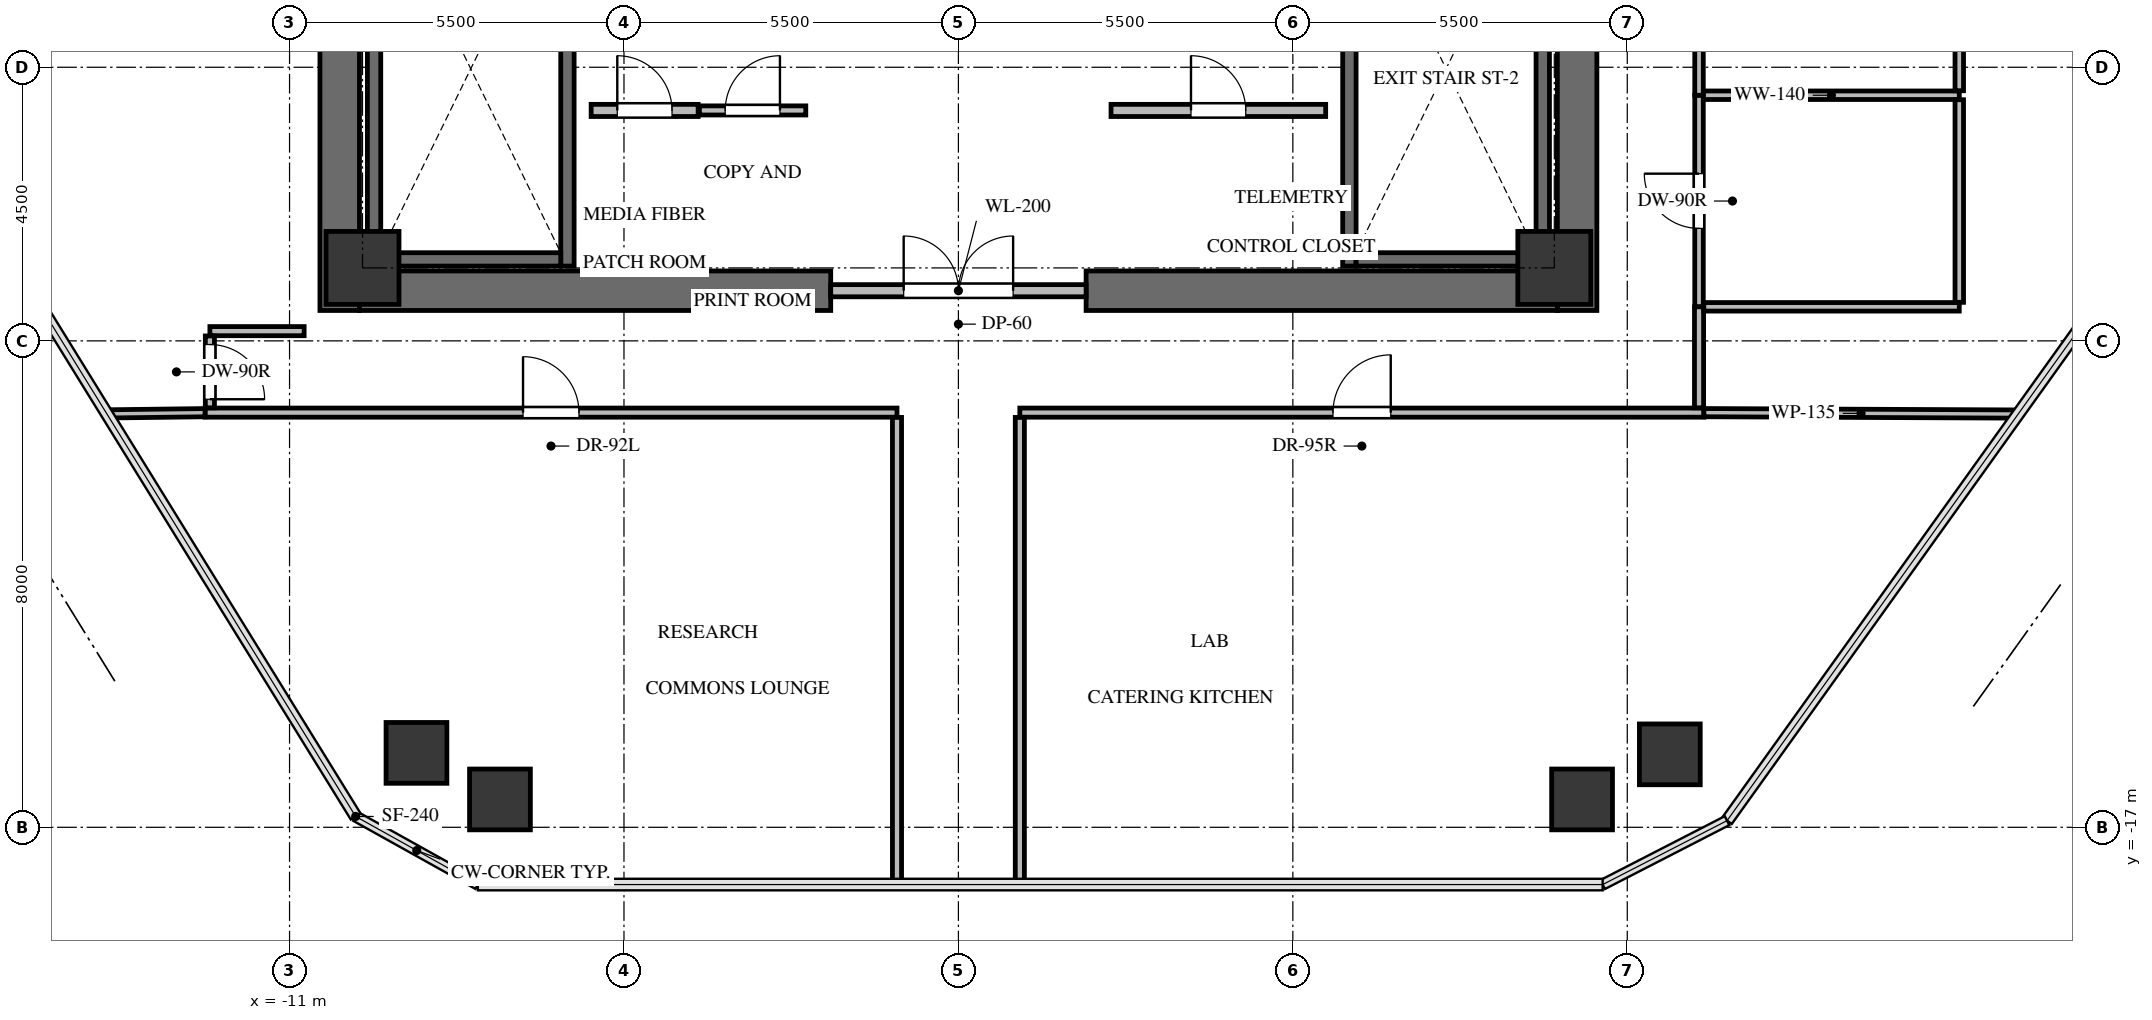
"""IFC4 building model, lengths in metres.
Left out: names, types, materials, properties, quantities, classifications, styles, units other than length and angle.
Written with IfcOpenShell. Run it as: python <this file> out.ifc"""

import sys

from ifc_helpers import new_model, si_unit, direction, frame, frame_2d, origin, origin_2d, place, context, subcontext, project, spatial, rectangle, extrude, source, transform, mapped, element, fill, save


model = new_model("IFC4")
c1 = context("Model", 3, precision=1e-05, world=origin(), true_north=direction((0.0, 1.0)))
c2 = subcontext(c1, "Body", "Model", "MODEL_VIEW")
j1 = project(units=[si_unit("LENGTHUNIT", "METRE"), si_unit("PLANEANGLEUNIT", "RADIAN")], contexts=[c1])
p1 = place(None, origin())
s1 = spatial("IfcSite", under=j1, at=p1, CompositionType="ELEMENT")
p2 = place(p1, origin())
s2 = spatial("IfcBuilding", under=s1, at=p2, CompositionType="ELEMENT")
p3 = place(p2, frame((0.0, 0.0, 167.2)))
s3 = spatial("IfcBuildingStorey", under=s2, at=p3, CompositionType="ELEMENT", Elevation=167.2)
for number, where, z_axis, x_axis in (
    (1, (-10.175, -8.5, 0.0), (0.0, 0.0, 1.0), (0.0, 1.0, 0.0)),
    (2, (10.175, -8.5, 0.0), (0.0, 0.0, 1.0), (0.0, 1.0, 0.0)),
):
    element("IfcWall", number, at=place(p3, frame(where, z_axis=z_axis, x_axis=x_axis)), inside=s3, PredefinedType="SHEAR", context=c2, shape_type="SweptSolid", body=[
        extrude(rectangle(XDim=17.0, YDim=0.65, at=frame_2d((8.5, 0.0))), origin(), (0.0, 0.0, 1.0), 3.3),
    ])
for number, where, z_axis, x_axis in (
    (3, (-9.85, -8.175, 0.0), (0.0, 0.0, 1.0), (1.0, 0.0, 0.0)),
    (4, (2.1, -8.175, 0.0), (0.0, 0.0, 1.0), (1.0, 0.0, 0.0)),
):
    element("IfcWall", number, at=place(p3, frame(where, z_axis=z_axis, x_axis=x_axis)), inside=s3, PredefinedType="SHEAR", context=c2, shape_type="SweptSolid", body=[
        extrude(rectangle(XDim=7.75, YDim=0.65, at=frame_2d((3.875, 0.0))), origin(), (0.0, 0.0, 1.0), 3.3),
    ])
p4 = place(p3, frame((-6.43, -7.77, -0.24), z_axis=(0.0, 0.0, 1.0), x_axis=(0.0, 1.0, 0.0)))
e5 = element("IfcWall", 5, at=p4, inside=s3, PredefinedType="SHEAR", context=c2, shape_type="SweptSolid", body=[
    extrude(rectangle(XDim=7.89, YDim=0.22, at=frame_2d((3.945, 0.0))), origin(), (0.0, 0.0, 1.0), 3.3),
])
p5 = place(p4, frame((6.32, 0.0, 0.0)))
e6 = element("IfcOpeningElement", 6, at=p5, cuts=e5, PredefinedType="OPENING", context=c2, shape_type="SweptSolid", body=[
    extrude(rectangle(XDim=1.05, YDim=2.15, at=frame_2d((0.525, 1.075))), frame((0.0, 0.12, 0.0), z_axis=(0.0, -1.0, 0.0), x_axis=(1.0, 0.0, 0.0)), (0.0, 0.0, 1.0), 0.24),
])
p6 = place(p3, frame((-9.61, 0.12, -0.24), z_axis=(0.0, 0.0, 1.0), x_axis=(0.0, -1.0, 0.0)))
e7 = element("IfcWall", 7, at=p6, inside=s3, PredefinedType="SHEAR", context=c2, shape_type="SweptSolid", body=[
    extrude(rectangle(XDim=7.89, YDim=0.22, at=frame_2d((3.945, 0.0))), origin(), (0.0, 0.0, 1.0), 3.3),
])
p7 = place(p3, frame((-9.5, -7.66, -0.24), z_axis=(0.0, 0.0, 1.0), x_axis=(1.0, 0.0, 0.0)))
e8 = element("IfcWall", 8, at=p7, inside=s3, PredefinedType="SHEAR", context=c2, shape_type="SweptSolid", body=[
    extrude(rectangle(XDim=2.96, YDim=0.22, at=frame_2d((1.48, 0.0))), origin(), (0.0, 0.0, 1.0), 3.3),
])
p8 = place(p3, frame((9.61, -7.77, -0.24), z_axis=(0.0, 0.0, 1.0), x_axis=(0.0, 1.0, 0.0)))
e9 = element("IfcWall", 9, at=p8, inside=s3, PredefinedType="SHEAR", context=c2, shape_type="SweptSolid", body=[
    extrude(rectangle(XDim=7.89, YDim=0.22, at=frame_2d((3.945, 0.0))), origin(), (0.0, 0.0, 1.0), 3.3),
])
p9 = place(p3, frame((6.43, 0.12, -0.24), z_axis=(0.0, 0.0, 1.0), x_axis=(0.0, -1.0, 0.0)))
e10 = element("IfcWall", 10, at=p9, inside=s3, PredefinedType="SHEAR", context=c2, shape_type="SweptSolid", body=[
    extrude(rectangle(XDim=7.89, YDim=0.22, at=frame_2d((3.945, 0.0))), origin(), (0.0, 0.0, 1.0), 3.3),
])
p10 = place(p9, frame((0.52, 0.0, 0.0)))
e11 = element("IfcOpeningElement", 11, at=p10, cuts=e10, PredefinedType="OPENING", context=c2, shape_type="SweptSolid", body=[
    extrude(rectangle(XDim=1.05, YDim=2.15, at=frame_2d((0.525, 1.075))), frame((0.0, 0.12, 0.0), z_axis=(0.0, -1.0, 0.0), x_axis=(1.0, 0.0, 0.0)), (0.0, 0.0, 1.0), 0.24),
])
p11 = place(p3, frame((6.54, -7.66, -0.24), z_axis=(0.0, 0.0, 1.0), x_axis=(1.0, 0.0, 0.0)))
e12 = element("IfcWall", 12, at=p11, inside=s3, PredefinedType="SHEAR", context=c2, shape_type="SweptSolid", body=[
    extrude(rectangle(XDim=2.96, YDim=0.22, at=frame_2d((1.48, 0.0))), origin(), (0.0, 0.0, 1.0), 3.3),
])
m1 = source(origin(), c2, "Body", "SweptSolid", [
    extrude(rectangle(XDim=1.2, YDim=1.2, at=origin_2d()), origin(), (0.0, 0.0, 1.0), 3.3),
])
for number, where, z_axis, x_axis in (
    (13, (-9.8, -7.8, -0.24), (0.0, 0.0, 1.0), (1.0, 0.0, 0.0)),
    (14, (9.8, -7.8, -0.24), (0.0, 0.0, 1.0), (1.0, 0.0, 0.0)),
):
    element("IfcColumn", number, at=place(p3, frame(where, z_axis=z_axis, x_axis=x_axis)), inside=s3, PredefinedType="COLUMN", context=c2, shape_type="MappedRepresentation", body=[
        mapped(m1, transform((0.0, 0.0, 0.0), x_axis=(1.0, 0.0, 0.0), y_axis=(0.0, 1.0, 0.0), z_axis=(0.0, 0.0, 1.0), scale=1.0)),
    ])
m2 = source(origin(), c2, "Body", "SweptSolid", [
    extrude(rectangle(XDim=1.0, YDim=1.0, at=origin_2d()), origin(), (0.0, 0.0, 1.0), 3.3),
])
for number, where, z_axis, x_axis in (
    (15, (-8.913, -15.776, -0.24), (0.0, 0.0, 1.0), (1.0, 0.0, 0.0)),
    (16, (11.7, -15.8, -0.24), (0.0, 0.0, 1.0), (1.0, 0.0, 0.0)),
    (17, (10.257, -16.542, -0.24), (0.0, 0.0, 1.0), (1.0, 0.0, 0.0)),
    (18, (-7.54, -16.542, -0.24), (0.0, 0.0, 1.0), (1.0, 0.0, 0.0)),
):
    element("IfcColumn", number, at=place(p3, frame(where, z_axis=z_axis, x_axis=x_axis)), inside=s3, PredefinedType="COLUMN", context=c2, shape_type="MappedRepresentation", body=[
        mapped(m2, transform((0.0, 0.0, 0.0), x_axis=(1.0, 0.0, 0.0), y_axis=(0.0, 1.0, 0.0), z_axis=(0.0, 0.0, 1.0), scale=1.0)),
    ])
p12 = place(p3, frame((-2.1, -8.175, 0.0), z_axis=(0.0, 0.0, 1.0), x_axis=(1.0, 0.0, 0.0)))
e19 = element("IfcWall", 19, at=p12, inside=s3, PredefinedType="SOLIDWALL", context=c2, shape_type="SweptSolid", body=[
    extrude(rectangle(XDim=4.2, YDim=0.2, at=frame_2d((2.1, 0.0))), origin(), (0.0, 0.0, 1.0), 3.045),
])
p13 = place(p12, frame((1.2, 0.0, 0.0)))
e20 = element("IfcOpeningElement", 20, at=p13, cuts=e19, PredefinedType="OPENING", context=c2, shape_type="SweptSolid", body=[
    extrude(rectangle(XDim=1.8, YDim=2.15, at=frame_2d((0.9, 1.075))), frame((0.0, 0.11, 0.0), z_axis=(0.0, -1.0, 0.0), x_axis=(1.0, 0.0, 0.0)), (0.0, 0.0, 1.0), 0.22),
])
p14 = place(p3, frame((-6.04, -5.21, 0.0), z_axis=(0.0, 0.0, 1.0), x_axis=(1.0, 0.0, 0.0)))
e21 = element("IfcWall", 21, at=p14, inside=s3, PredefinedType="SOLIDWALL", context=c2, shape_type="SweptSolid", body=[
    extrude(rectangle(XDim=1.76, YDim=0.2, at=frame_2d((0.88, 0.0))), origin(), (0.0, 0.0, 1.0), 3.045),
])
p15 = place(p14, frame((0.43, 0.0, 0.0)))
e22 = element("IfcOpeningElement", 22, at=p15, cuts=e21, PredefinedType="OPENING", context=c2, shape_type="SweptSolid", body=[
    extrude(rectangle(XDim=0.9, YDim=2.05, at=frame_2d((0.45, 1.025))), frame((0.0, 0.11, 0.0), z_axis=(0.0, -1.0, 0.0), x_axis=(1.0, 0.0, 0.0)), (0.0, 0.0, 1.0), 0.22),
])
p16 = place(p3, frame((-4.26, -5.21, 0.0), z_axis=(0.0, 0.0, 1.0), x_axis=(1.0, 0.0, 0.0)))
e23 = element("IfcWall", 23, at=p16, inside=s3, PredefinedType="PARTITIONING", context=c2, shape_type="SweptSolid", body=[
    extrude(rectangle(XDim=1.75, YDim=0.15, at=frame_2d((0.875, 0.0))), origin(), (0.0, 0.0, 1.0), 3.045),
])
p17 = place(p16, frame((0.425, 0.0, 0.0)))
e24 = element("IfcOpeningElement", 24, at=p17, cuts=e23, PredefinedType="OPENING", context=c2, shape_type="SweptSolid", body=[
    extrude(rectangle(XDim=0.9, YDim=2.05, at=frame_2d((0.45, 1.025))), frame((0.0, 0.085, 0.0), z_axis=(0.0, -1.0, 0.0), x_axis=(1.0, 0.0, 0.0)), (0.0, 0.0, 1.0), 0.17),
])
p18 = place(p3, frame((2.51, -5.21, 0.0), z_axis=(0.0, 0.0, 1.0), x_axis=(1.0, 0.0, 0.0)))
e25 = element("IfcWall", 25, at=p18, inside=s3, PredefinedType="SOLIDWALL", context=c2, shape_type="SweptSolid", body=[
    extrude(rectangle(XDim=3.53, YDim=0.2, at=frame_2d((1.765, 0.0))), origin(), (0.0, 0.0, 1.0), 3.045),
])
p19 = place(p18, frame((1.315, 0.0, 0.0)))
e26 = element("IfcOpeningElement", 26, at=p19, cuts=e25, PredefinedType="OPENING", context=c2, shape_type="SweptSolid", body=[
    extrude(rectangle(XDim=0.9, YDim=2.05, at=frame_2d((0.45, 1.025))), frame((0.0, 0.11, 0.0), z_axis=(0.0, -1.0, 0.0), x_axis=(1.0, 0.0, 0.0)), (0.0, 0.0, 1.0), 0.22),
])
p20 = place(p3, frame((12.18, -8.44, 0.0), z_axis=(0.0, 0.0, 1.0), x_axis=(0.0, 1.0, 0.0)))
e27 = element("IfcWall", 27, at=p20, inside=s3, PredefinedType="PARTITIONING", context=c2, shape_type="SweptSolid", body=[
    extrude(rectangle(XDim=3.48, YDim=0.14, at=frame_2d((1.74, 0.0))), origin(), (0.0, 0.0, 1.0), 3.045),
])
p21 = place(p20, frame((1.29, 0.0, 0.0)))
e28 = element("IfcOpeningElement", 28, at=p21, cuts=e27, PredefinedType="OPENING", context=c2, shape_type="SweptSolid", body=[
    extrude(rectangle(XDim=0.9, YDim=2.05, at=frame_2d((0.45, 1.025))), frame((0.0, 0.08, 0.0), z_axis=(0.0, -1.0, 0.0), x_axis=(1.0, 0.0, 0.0)), (0.0, 0.0, 1.0), 0.16),
])
p22 = place(p3, frame((12.18, -4.96, 0.0), z_axis=(0.0, 0.0, 1.0), x_axis=(0.0, 1.0, 0.0)))
e29 = element("IfcWall", 29, at=p22, inside=s3, PredefinedType="PARTITIONING", context=c2, shape_type="SweptSolid", body=[
    extrude(rectangle(XDim=3.4, YDim=0.14, at=frame_2d((1.7, 0.0))), origin(), (0.0, 0.0, 1.0), 3.045),
])
p23 = place(p22, frame((1.25, 0.0, 0.0)))
e30 = element("IfcOpeningElement", 30, at=p23, cuts=e29, PredefinedType="OPENING", context=c2, shape_type="SweptSolid", body=[
    extrude(rectangle(XDim=0.9, YDim=2.05, at=frame_2d((0.45, 1.025))), frame((0.0, 0.08, 0.0), z_axis=(0.0, -1.0, 0.0), x_axis=(1.0, 0.0, 0.0)), (0.0, 0.0, 1.0), 0.16),
])
p24 = place(p3, frame((-12.39, -10.18, 0.0), z_axis=(0.0, 0.0, 1.0), x_axis=(1.0, 0.0, 0.0)))
e31 = element("IfcWall", 31, at=p24, inside=s3, PredefinedType="PARTITIONING", context=c2, shape_type="SweptSolid", body=[
    extrude(rectangle(XDim=11.38, YDim=0.15, at=frame_2d((5.69, 0.0))), origin(), (0.0, 0.0, 1.0), 2.242),
])
p25 = place(p24, frame((5.23, 0.0, 0.0)))
e32 = element("IfcOpeningElement", 32, at=p25, cuts=e31, PredefinedType="OPENING", context=c2, shape_type="SweptSolid", body=[
    extrude(rectangle(XDim=0.92, YDim=2.1, at=frame_2d((0.46, 1.05))), frame((0.0, 0.085, 0.0), z_axis=(0.0, -1.0, 0.0), x_axis=(1.0, 0.0, 0.0)), (0.0, 0.0, 1.0), 0.17),
])
p26 = place(p3, frame((-1.01, -10.259, 0.0), z_axis=(0.0, 0.0, 1.0), x_axis=(0.0, -1.0, 0.0)))
e33 = element("IfcWall", 33, at=p26, inside=s3, PredefinedType="PARTITIONING", context=c2, shape_type="SweptSolid", body=[
    extrude(rectangle(XDim=7.683, YDim=0.15, at=frame_2d((3.841, 0.0))), origin(), (0.0, 0.0, 1.0), 2.399),
])
p27 = place(p3, frame((1.01, -10.18, 0.0), z_axis=(0.0, 0.0, 1.0), x_axis=(1.0, 0.0, 0.0)))
e34 = element("IfcWall", 34, at=p27, inside=s3, PredefinedType="PARTITIONING", context=c2, shape_type="SweptSolid", body=[
    extrude(rectangle(XDim=11.25, YDim=0.15, at=frame_2d((5.625, 0.0))), origin(), (0.0, 0.0, 1.0), 2.242),
])
p28 = place(p27, frame((5.15, 0.0, 0.0)))
e35 = element("IfcOpeningElement", 35, at=p28, cuts=e34, PredefinedType="OPENING", context=c2, shape_type="SweptSolid", body=[
    extrude(rectangle(XDim=0.95, YDim=2.1, at=frame_2d((0.475, 1.05))), frame((0.0, 0.085, 0.0), z_axis=(0.0, -1.0, 0.0), x_axis=(1.0, 0.0, 0.0)), (0.0, 0.0, 1.0), 0.17),
])
p29 = place(p3, frame((1.01, -17.942, 0.0), z_axis=(0.0, 0.0, 1.0), x_axis=(0.0, 1.0, 0.0)))
e36 = element("IfcWall", 36, at=p29, inside=s3, PredefinedType="PARTITIONING", context=c2, shape_type="SweptSolid", body=[
    extrude(rectangle(XDim=7.683, YDim=0.15, at=frame_2d((3.841, 0.0))), origin(), (0.0, 0.0, 1.0), 2.399),
])
p30 = place(p3, frame((-10.76, -8.84, 0.0), z_axis=(0.0, 0.0, 1.0), x_axis=(-1.0, 0.0, 0.0)))
e37 = element("IfcWall", 37, at=p30, inside=s3, PredefinedType="PARTITIONING", context=c2, shape_type="SweptSolid", body=[
    extrude(rectangle(XDim=1.55, YDim=0.15, at=frame_2d((0.775, 0.0))), origin(), (0.0, 0.0, 1.0), 3.045),
])
p31 = place(p3, frame((-12.31, -8.919, 0.0), z_axis=(0.0, 0.0, 1.0), x_axis=(0.0, -1.0, 0.0)))
e38 = element("IfcWall", 38, at=p31, inside=s3, PredefinedType="PARTITIONING", context=c2, shape_type="SweptSolid", body=[
    extrude(rectangle(XDim=1.182, YDim=0.15, at=frame_2d((0.591, 0.0))), origin(), (0.0, 0.0, 1.0), 2.399),
])
p32 = place(p31, frame((0.141, 0.0, 0.0)))
e39 = element("IfcOpeningElement", 39, at=p32, cuts=e38, PredefinedType="OPENING", context=c2, shape_type="SweptSolid", body=[
    extrude(rectangle(XDim=0.9, YDim=2.05, at=frame_2d((0.45, 1.025))), frame((0.0, 0.085, 0.0), z_axis=(0.0, -1.0, 0.0), x_axis=(1.0, 0.0, 0.0)), (0.0, 0.0, 1.0), 0.17),
])
p33 = place(p3, frame((12.18, -10.101, 0.0), z_axis=(0.0, 0.0, 1.0), x_axis=(0.0, 1.0, 0.0)))
e40 = element("IfcWall", 40, at=p33, inside=s3, PredefinedType="PARTITIONING", context=c2, shape_type="SweptSolid", body=[
    extrude(rectangle(XDim=1.661, YDim=0.15, at=frame_2d((0.831, 0.0))), origin(), (0.0, 0.0, 1.0), 3.045),
])
p34 = place(p3, frame((12.254, -4.96, 0.0), z_axis=(0.0, 0.0, 1.0), x_axis=(1.0, 0.0, 0.0)))
e41 = element("IfcWall", 41, at=p34, inside=s3, PredefinedType="PARTITIONING", context=c2, shape_type="SweptSolid", body=[
    extrude(rectangle(XDim=4.206, YDim=0.14, at=frame_2d((2.103, 0.0))), origin(), (0.0, 0.0, 1.0), 3.045),
])
p35 = place(p3, frame((16.46, -8.44, 0.0), z_axis=(0.0, 0.0, 1.0), x_axis=(-1.0, 0.0, 0.0)))
e42 = element("IfcWall", 42, at=p35, inside=s3, PredefinedType="PARTITIONING", context=c2, shape_type="SweptSolid", body=[
    extrude(rectangle(XDim=4.201, YDim=0.14, at=frame_2d((2.101, 0.0))), origin(), (0.0, 0.0, 1.0), 3.045),
])
p36 = place(p3, frame((16.46, -5.034, 0.0), z_axis=(0.0, 0.0, 1.0), x_axis=(0.0, -1.0, 0.0)))
e43 = element("IfcWall", 43, at=p36, inside=s3, PredefinedType="PARTITIONING", context=c2, shape_type="SweptSolid", body=[
    extrude(rectangle(XDim=3.332, YDim=0.14, at=frame_2d((1.666, 0.0))), origin(), (0.0, 0.0, 1.0), 3.045),
])
p37 = place(p3, frame((16.46, -1.634, 0.0), z_axis=(0.0, 0.0, 1.0), x_axis=(0.0, -1.0, 0.0)))
e44 = element("IfcWall", 44, at=p37, inside=s3, PredefinedType="PARTITIONING", context=c2, shape_type="SweptSolid", body=[
    extrude(rectangle(XDim=3.252, YDim=0.14, at=frame_2d((1.626, 0.0))), origin(), (0.0, 0.0, 1.0), 3.045),
])
p38 = place(p3, frame((-14.004, -10.201, 0.0), z_axis=(0.0, 0.0, 1.0), x_axis=(0.999923084603, 0.012402615782, 0.0)))
e45 = element("IfcWall", 45, at=p38, inside=s3, PredefinedType="PARTITIONING", context=c2, shape_type="SweptSolid", body=[
    extrude(rectangle(XDim=1.614, YDim=0.135, at=frame_2d((0.807, 0.0))), origin(), (0.0, 0.0, 1.0), 2.399),
])
p39 = place(p3, frame((12.26, -10.18, 0.0), z_axis=(0.0, 0.0, 1.0), x_axis=(0.999990144117, -0.004439782427, 0.0)))
e46 = element("IfcWall", 46, at=p39, inside=s3, PredefinedType="PARTITIONING", context=c2, shape_type="SweptSolid", body=[
    extrude(rectangle(XDim=5.169, YDim=0.135, at=frame_2d((2.584, 0.0))), origin(), (0.0, 0.0, 1.0), 2.399),
])
m3 = source(origin(), c2, "Body", "SweptSolid", [
    extrude(rectangle(XDim=1.8, YDim=2.15, at=frame_2d((0.9, 1.075))), frame((0.0, 0.025, 0.0), z_axis=(0.0, -1.0, 0.0), x_axis=(1.0, 0.0, 0.0)), (0.0, 0.0, 1.0), 0.05),
])
p40 = place(p13, origin())
e47 = element("IfcDoor", 47, at=p40, inside=s3, OperationType="DOUBLE_DOOR_SINGLE_SWING", PredefinedType="DOOR", context=c2, shape_type="MappedRepresentation", body=[
    mapped(m3, transform((0.0, 0.0, 0.0), x_axis=(1.0, 0.0, 0.0), y_axis=(0.0, 1.0, 0.0), z_axis=(0.0, 0.0, 1.0), scale=1.0)),
])
fill(e20, e47)
m4 = source(origin(), c2, "Body", "SweptSolid", [
    extrude(rectangle(XDim=0.9, YDim=2.05, at=frame_2d((0.45, 1.025))), frame((0.0, 0.025, 0.0), z_axis=(0.0, -1.0, 0.0), x_axis=(1.0, 0.0, 0.0)), (0.0, 0.0, 1.0), 0.05),
])
p41 = place(p15, origin())
e48 = element("IfcDoor", 48, at=p41, inside=s3, OperationType="SINGLE_SWING_LEFT", PredefinedType="DOOR", context=c2, shape_type="MappedRepresentation", body=[
    mapped(m4, transform((0.0, 0.0, 0.0), x_axis=(1.0, 0.0, 0.0), y_axis=(0.0, 1.0, 0.0), z_axis=(0.0, 0.0, 1.0), scale=1.0)),
])
fill(e22, e48)
m5 = source(origin(), c2, "Body", "SweptSolid", [
    extrude(rectangle(XDim=0.9, YDim=2.05, at=frame_2d((0.45, 1.025))), frame((0.0, 0.025, 0.0), z_axis=(0.0, -1.0, 0.0), x_axis=(1.0, 0.0, 0.0)), (0.0, 0.0, 1.0), 0.05),
])
p42 = place(p17, origin())
e49 = element("IfcDoor", 49, at=p42, inside=s3, OperationType="SINGLE_SWING_RIGHT", PredefinedType="DOOR", context=c2, shape_type="MappedRepresentation", body=[
    mapped(m5, transform((0.0, 0.0, 0.0), x_axis=(1.0, 0.0, 0.0), y_axis=(0.0, 1.0, 0.0), z_axis=(0.0, 0.0, 1.0), scale=1.0)),
])
fill(e24, e49)
p43 = place(p19, origin())
e50 = element("IfcDoor", 50, at=p43, inside=s3, OperationType="SINGLE_SWING_LEFT", PredefinedType="DOOR", context=c2, shape_type="MappedRepresentation", body=[
    mapped(m4, transform((0.0, 0.0, 0.0), x_axis=(1.0, 0.0, 0.0), y_axis=(0.0, 1.0, 0.0), z_axis=(0.0, 0.0, 1.0), scale=1.0)),
])
fill(e26, e50)
m6 = source(origin(), c2, "Body", "SweptSolid", [
    extrude(rectangle(XDim=0.9, YDim=2.05, at=frame_2d((0.45, 1.025))), frame((0.0, 0.025, 0.0), z_axis=(0.0, -1.0, 0.0), x_axis=(1.0, 0.0, 0.0)), (0.0, 0.0, 1.0), 0.05),
])
p44 = place(p21, origin())
e51 = element("IfcDoor", 51, at=p44, inside=s3, OperationType="SINGLE_SWING_RIGHT", PredefinedType="DOOR", context=c2, shape_type="MappedRepresentation", body=[
    mapped(m6, transform((0.0, 0.0, 0.0), x_axis=(1.0, 0.0, 0.0), y_axis=(0.0, 1.0, 0.0), z_axis=(0.0, 0.0, 1.0), scale=1.0)),
])
fill(e28, e51)
m7 = source(origin(), c2, "Body", "SweptSolid", [
    extrude(rectangle(XDim=0.92, YDim=2.1, at=frame_2d((0.46, 1.05))), frame((0.0, 0.025, 0.0), z_axis=(0.0, -1.0, 0.0), x_axis=(1.0, 0.0, 0.0)), (0.0, 0.0, 1.0), 0.05),
])
p45 = place(p25, origin())
e52 = element("IfcDoor", 52, at=p45, inside=s3, OperationType="SINGLE_SWING_LEFT", PredefinedType="DOOR", context=c2, shape_type="MappedRepresentation", body=[
    mapped(m7, transform((0.0, 0.0, 0.0), x_axis=(1.0, 0.0, 0.0), y_axis=(0.0, 1.0, 0.0), z_axis=(0.0, 0.0, 1.0), scale=1.0)),
])
fill(e32, e52)
m8 = source(origin(), c2, "Body", "SweptSolid", [
    extrude(rectangle(XDim=0.95, YDim=2.1, at=frame_2d((0.475, 1.05))), frame((0.0, 0.025, 0.0), z_axis=(0.0, -1.0, 0.0), x_axis=(1.0, 0.0, 0.0)), (0.0, 0.0, 1.0), 0.05),
])
p46 = place(p28, origin())
e53 = element("IfcDoor", 53, at=p46, inside=s3, OperationType="SINGLE_SWING_RIGHT", PredefinedType="DOOR", context=c2, shape_type="MappedRepresentation", body=[
    mapped(m8, transform((0.0, 0.0, 0.0), x_axis=(1.0, 0.0, 0.0), y_axis=(0.0, 1.0, 0.0), z_axis=(0.0, 0.0, 1.0), scale=1.0)),
])
fill(e35, e53)
p47 = place(p32, origin())
e54 = element("IfcDoor", 54, at=p47, inside=s3, OperationType="SINGLE_SWING_RIGHT", PredefinedType="DOOR", context=c2, shape_type="MappedRepresentation", body=[
    mapped(m6, transform((0.0, 0.0, 0.0), x_axis=(1.0, 0.0, 0.0), y_axis=(0.0, 1.0, 0.0), z_axis=(0.0, 0.0, 1.0), scale=1.0)),
])
fill(e39, e54)
save(model, sys.argv[1])
